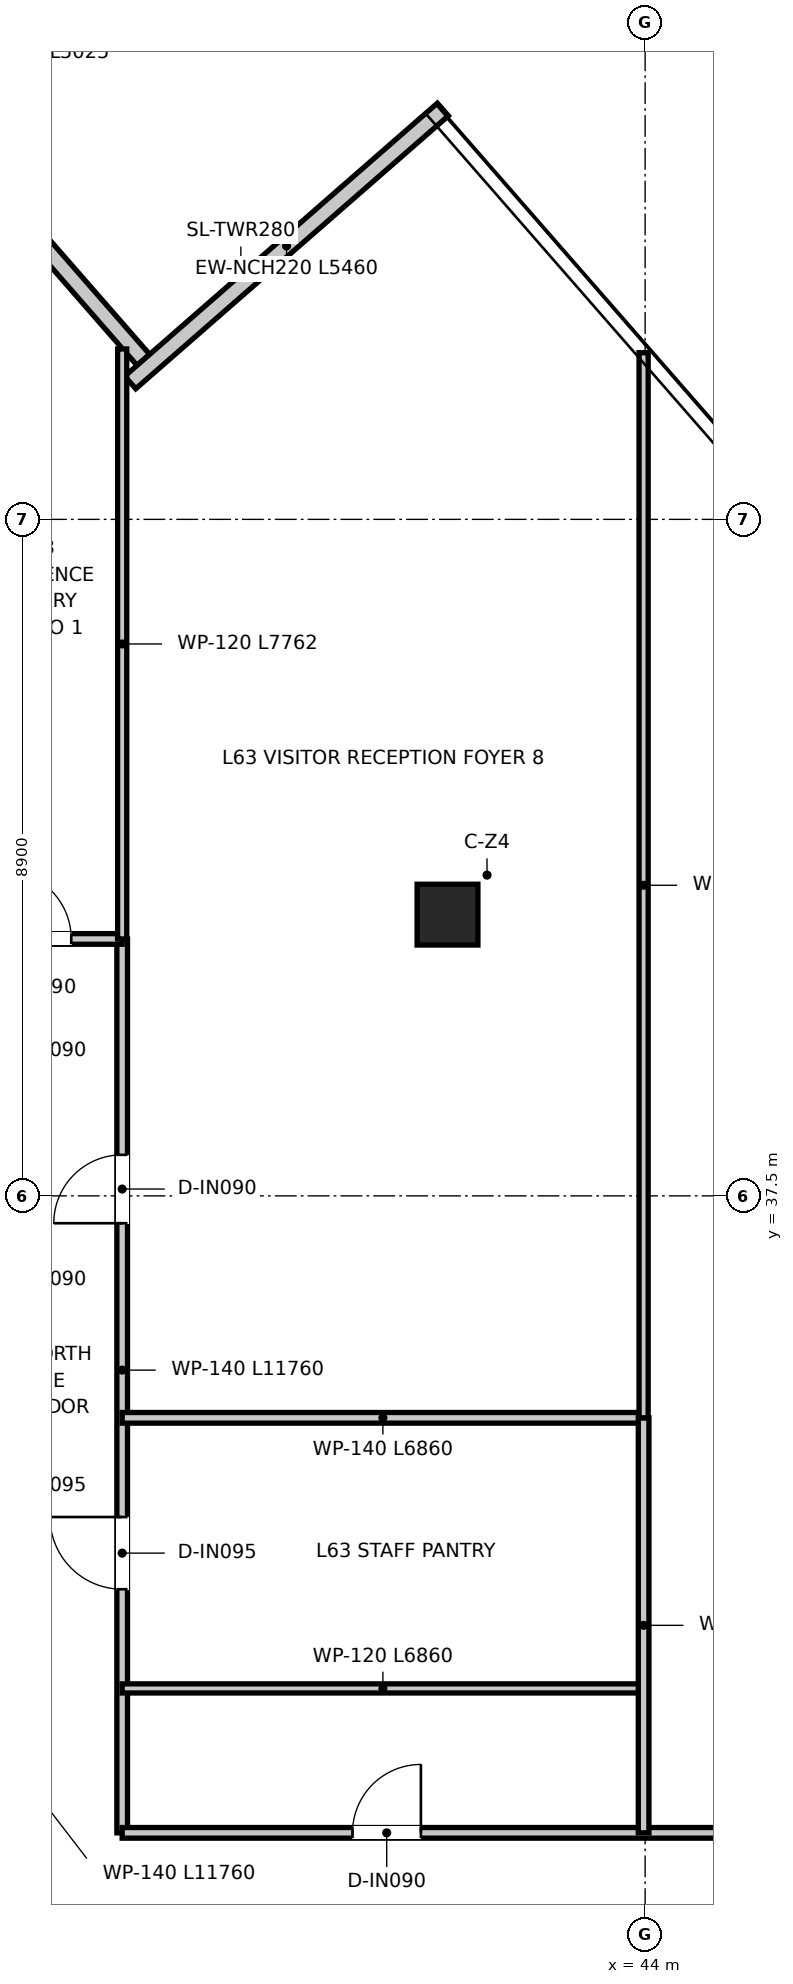
"""IFC4 building model, lengths in metres.
Left out: names, types, materials, properties, quantities, classifications, styles, units other than length and angle.
Written with IfcOpenShell. Run it as: python <this file> out.ifc"""

import sys

from ifc_helpers import new_model, si_unit, direction, frame, frame_2d, origin, origin_2d, place, context, subcontext, project, spatial, rectangle, extrude, source, transform, mapped, element, fill, save


model = new_model("IFC4")
c1 = context("Model", 3, precision=1e-05, world=origin(), true_north=direction((0.0, 1.0)))
c2 = subcontext(c1, "Body", "Model", "MODEL_VIEW")
j1 = project(units=[si_unit("LENGTHUNIT", "METRE"), si_unit("PLANEANGLEUNIT", "RADIAN")], contexts=[c1])
p1 = place(None, origin())
s1 = spatial("IfcSite", under=j1, at=p1, CompositionType="ELEMENT")
p2 = place(p1, origin())
s2 = spatial("IfcBuilding", under=s1, at=p2, CompositionType="ELEMENT")
p3 = place(p2, frame((0.0, 0.0, 258.65)))
s3 = spatial("IfcBuildingStorey", under=s2, at=p3, CompositionType="ELEMENT", Elevation=258.65)
m1 = source(origin(), c2, "Body", "SweptSolid", [
    extrude(rectangle(XDim=0.8, YDim=0.8, at=origin_2d()), origin(), (0.0, 0.0, 1.0), 3.95),
])
p4 = place(p3, frame((41.4, 41.2, 0.0), z_axis=(0.0, 0.0, 1.0), x_axis=(1.0, 0.0, 0.0)))
e1 = element("IfcColumn", 1, at=p4, inside=s3, PredefinedType="COLUMN", context=c2, shape_type="MappedRepresentation", body=[
    mapped(m1, transform((0.0, 0.0, 0.0), x_axis=(1.0, 0.0, 0.0), y_axis=(0.0, 1.0, 0.0), z_axis=(0.0, 0.0, 1.0), scale=1.0)),
])
p5 = place(p3, frame((37.398, 48.498, 0.0), z_axis=(0.0, 0.0, 1.0), x_axis=(-0.657706226339, 0.753274531518, 0.0)))
e2 = element("IfcWall", 2, at=p5, inside=s3, PredefinedType="ELEMENTEDWALL", context=c2, shape_type="SweptSolid", body=[
    extrude(rectangle(XDim=5.025, YDim=0.22, at=frame_2d((2.512, 0.0))), origin(), (0.0, 0.0, 1.0), 3.6),
])
p6 = place(p3, frame((41.339, 51.792, 0.0), z_axis=(0.0, 0.0, 1.0), x_axis=(-0.753268767402, -0.657712827955, 0.0)))
e3 = element("IfcWall", 3, at=p6, inside=s3, PredefinedType="ELEMENTEDWALL", context=c2, shape_type="SweptSolid", body=[
    extrude(rectangle(XDim=5.46, YDim=0.22, at=frame_2d((2.73, 0.0))), origin(), (0.0, 0.0, 1.0), 3.6),
])
p7 = place(p3, frame((37.12, 29.12, 0.0), z_axis=(0.0, 0.0, 1.0), x_axis=(0.0, 1.0, 0.0)))
e4 = element("IfcWall", 4, at=p7, inside=s3, PredefinedType="PARTITIONING", context=c2, shape_type="SweptSolid", body=[
    extrude(rectangle(XDim=11.76, YDim=0.14, at=frame_2d((5.88, 0.0))), origin(), (0.0, 0.0, 1.0), 2.96),
])
p8 = place(p7, frame((3.205, 0.0, 0.0)))
e5 = element("IfcOpeningElement", 5, at=p8, cuts=e4, PredefinedType="OPENING", context=c2, shape_type="SweptSolid", body=[
    extrude(rectangle(XDim=0.95, YDim=2.1, at=frame_2d((0.475, 1.05))), frame((0.0, 0.08, 0.0), z_axis=(0.0, -1.0, 0.0), x_axis=(1.0, 0.0, 0.0)), (0.0, 0.0, 1.0), 0.16),
])
p9 = place(p7, frame((8.02, 0.0, 0.0)))
e6 = element("IfcOpeningElement", 6, at=p9, cuts=e4, PredefinedType="OPENING", context=c2, shape_type="SweptSolid", body=[
    extrude(rectangle(XDim=0.9, YDim=2.1, at=frame_2d((0.45, 1.05))), frame((0.0, 0.08, 0.0), z_axis=(0.0, -1.0, 0.0), x_axis=(1.0, 0.0, 0.0)), (0.0, 0.0, 1.0), 0.16),
])
p10 = place(p3, frame((34.88, 40.88, 0.0), z_axis=(0.0, 0.0, 1.0), x_axis=(1.0, 0.0, 0.0)))
e7 = element("IfcWall", 7, at=p10, inside=s3, PredefinedType="PARTITIONING", context=c2, shape_type="SweptSolid", body=[
    extrude(rectangle(XDim=2.24, YDim=0.14, at=frame_2d((1.12, 0.0))), origin(), (0.0, 0.0, 1.0), 3.6),
])
p11 = place(p10, frame((0.67, 0.0, 0.0)))
e8 = element("IfcOpeningElement", 8, at=p11, cuts=e7, PredefinedType="OPENING", context=c2, shape_type="SweptSolid", body=[
    extrude(rectangle(XDim=0.9, YDim=2.1, at=frame_2d((0.45, 1.05))), frame((0.0, 0.08, 0.0), z_axis=(0.0, -1.0, 0.0), x_axis=(1.0, 0.0, 0.0)), (0.0, 0.0, 1.0), 0.16),
])
p12 = place(p3, frame((37.12, 29.12, 0.0), z_axis=(0.0, 0.0, 1.0), x_axis=(1.0, 0.0, 0.0)))
e9 = element("IfcWall", 9, at=p12, inside=s3, PredefinedType="PARTITIONING", context=c2, shape_type="SweptSolid", body=[
    extrude(rectangle(XDim=23.862, YDim=0.14, at=frame_2d((11.931, 0.0))), origin(), (0.0, 0.0, 1.0), 2.96),
])
p13 = place(p12, frame((3.03, 0.0, 0.0)))
e10 = element("IfcOpeningElement", 10, at=p13, cuts=e9, PredefinedType="OPENING", context=c2, shape_type="SweptSolid", body=[
    extrude(rectangle(XDim=0.9, YDim=2.1, at=frame_2d((0.45, 1.05))), frame((0.0, 0.08, 0.0), z_axis=(0.0, -1.0, 0.0), x_axis=(1.0, 0.0, 0.0)), (0.0, 0.0, 1.0), 0.16),
])
p14 = place(p12, frame((8.42, 0.0, 0.0)))
e11 = element("IfcOpeningElement", 11, at=p14, cuts=e9, PredefinedType="OPENING", context=c2, shape_type="SweptSolid", body=[
    extrude(rectangle(XDim=0.9, YDim=2.1, at=frame_2d((0.45, 1.05))), frame((0.0, 0.08, 0.0), z_axis=(0.0, -1.0, 0.0), x_axis=(1.0, 0.0, 0.0)), (0.0, 0.0, 1.0), 0.16),
])
p15 = place(p12, frame((12.03, 0.0, 0.0)))
e12 = element("IfcOpeningElement", 12, at=p15, cuts=e9, PredefinedType="OPENING", context=c2, shape_type="SweptSolid", body=[
    extrude(rectangle(XDim=0.9, YDim=2.1, at=frame_2d((0.45, 1.05))), frame((0.0, 0.08, 0.0), z_axis=(0.0, -1.0, 0.0), x_axis=(1.0, 0.0, 0.0)), (0.0, 0.0, 1.0), 0.16),
])
p16 = place(p12, frame((18.293, 0.0, 0.0)))
e13 = element("IfcOpeningElement", 13, at=p16, cuts=e9, PredefinedType="OPENING", context=c2, shape_type="SweptSolid", body=[
    extrude(rectangle(XDim=0.9, YDim=2.1, at=frame_2d((0.45, 1.05))), frame((0.0, 0.08, 0.0), z_axis=(0.0, -1.0, 0.0), x_axis=(1.0, 0.0, 0.0)), (0.0, 0.0, 1.0), 0.16),
])
p17 = place(p3, frame((37.12, 31.02, 0.0), z_axis=(0.0, 0.0, 1.0), x_axis=(1.0, 0.0, 0.0)))
e14 = element("IfcWall", 14, at=p17, inside=s3, PredefinedType="PARTITIONING", context=c2, shape_type="SweptSolid", body=[
    extrude(rectangle(XDim=6.86, YDim=0.12, at=frame_2d((3.43, 0.0))), origin(), (0.0, 0.0, 1.0), 3.11),
])
p18 = place(p3, frame((37.12, 34.58, 0.0), z_axis=(0.0, 0.0, 1.0), x_axis=(1.0, 0.0, 0.0)))
e15 = element("IfcWall", 15, at=p18, inside=s3, PredefinedType="PARTITIONING", context=c2, shape_type="SweptSolid", body=[
    extrude(rectangle(XDim=6.86, YDim=0.14, at=frame_2d((3.43, 0.0))), origin(), (0.0, 0.0, 1.0), 3.11),
])
p19 = place(p3, frame((43.98, 29.12, 0.0), z_axis=(0.0, 0.0, 1.0), x_axis=(0.0, 1.0, 0.0)))
e16 = element("IfcWall", 16, at=p19, inside=s3, PredefinedType="PARTITIONING", context=c2, shape_type="SweptSolid", body=[
    extrude(rectangle(XDim=5.46, YDim=0.14, at=frame_2d((2.73, 0.0))), origin(), (0.0, 0.0, 1.0), 3.3),
])
p20 = place(p3, frame((37.12, 40.88, 0.0), z_axis=(0.0, 0.0, 1.0), x_axis=(0.0, 1.0, 0.0)))
e17 = element("IfcWall", 17, at=p20, inside=s3, PredefinedType="PARTITIONING", context=c2, shape_type="SweptSolid", body=[
    extrude(rectangle(XDim=7.762, YDim=0.12, at=frame_2d((3.881, 0.0))), origin(), (0.0, 0.0, 1.0), 3.21),
])
p21 = place(p3, frame((43.98, 34.58, 0.0), z_axis=(0.0, 0.0, 1.0), x_axis=(0.0, 1.0, 0.0)))
e18 = element("IfcWall", 18, at=p21, inside=s3, PredefinedType="PARTITIONING", context=c2, shape_type="SweptSolid", body=[
    extrude(rectangle(XDim=14.012, YDim=0.12, at=frame_2d((7.006, 0.0))), origin(), (0.0, 0.0, 1.0), 2.96),
])
p22 = place(p13, origin())
e19 = element("IfcDoor", 19, at=p22, inside=s3, OperationType="SINGLE_SWING_RIGHT", PredefinedType="DOOR", context=c2, shape_type="SweptSolid", body=[
    extrude(rectangle(XDim=0.9, YDim=2.1, at=frame_2d((0.45, 1.05))), frame((0.0, 0.025, 0.0), z_axis=(0.0, -1.0, 0.0), x_axis=(1.0, 0.0, 0.0)), (0.0, 0.0, 1.0), 0.05),
])
fill(e10, e19)
p23 = place(p8, origin())
e20 = element("IfcDoor", 20, at=p23, inside=s3, OperationType="SINGLE_SWING_RIGHT", PredefinedType="DOOR", context=c2, shape_type="SweptSolid", body=[
    extrude(rectangle(XDim=0.95, YDim=2.1, at=frame_2d((0.475, 1.05))), frame((0.0, 0.025, 0.0), z_axis=(0.0, -1.0, 0.0), x_axis=(1.0, 0.0, 0.0)), (0.0, 0.0, 1.0), 0.05),
])
fill(e5, e20)
p24 = place(p11, origin())
e21 = element("IfcDoor", 21, at=p24, inside=s3, OperationType="SINGLE_SWING_LEFT", PredefinedType="DOOR", context=c2, shape_type="SweptSolid", body=[
    extrude(rectangle(XDim=0.9, YDim=2.1, at=frame_2d((0.45, 1.05))), frame((0.0, 0.025, 0.0), z_axis=(0.0, -1.0, 0.0), x_axis=(1.0, 0.0, 0.0)), (0.0, 0.0, 1.0), 0.05),
])
fill(e8, e21)
p25 = place(p9, origin())
e22 = element("IfcDoor", 22, at=p25, inside=s3, OperationType="SINGLE_SWING_LEFT", PredefinedType="DOOR", context=c2, shape_type="SweptSolid", body=[
    extrude(rectangle(XDim=0.9, YDim=2.1, at=frame_2d((0.45, 1.05))), frame((0.0, 0.025, 0.0), z_axis=(0.0, -1.0, 0.0), x_axis=(1.0, 0.0, 0.0)), (0.0, 0.0, 1.0), 0.05),
])
fill(e6, e22)
save(model, sys.argv[1])
